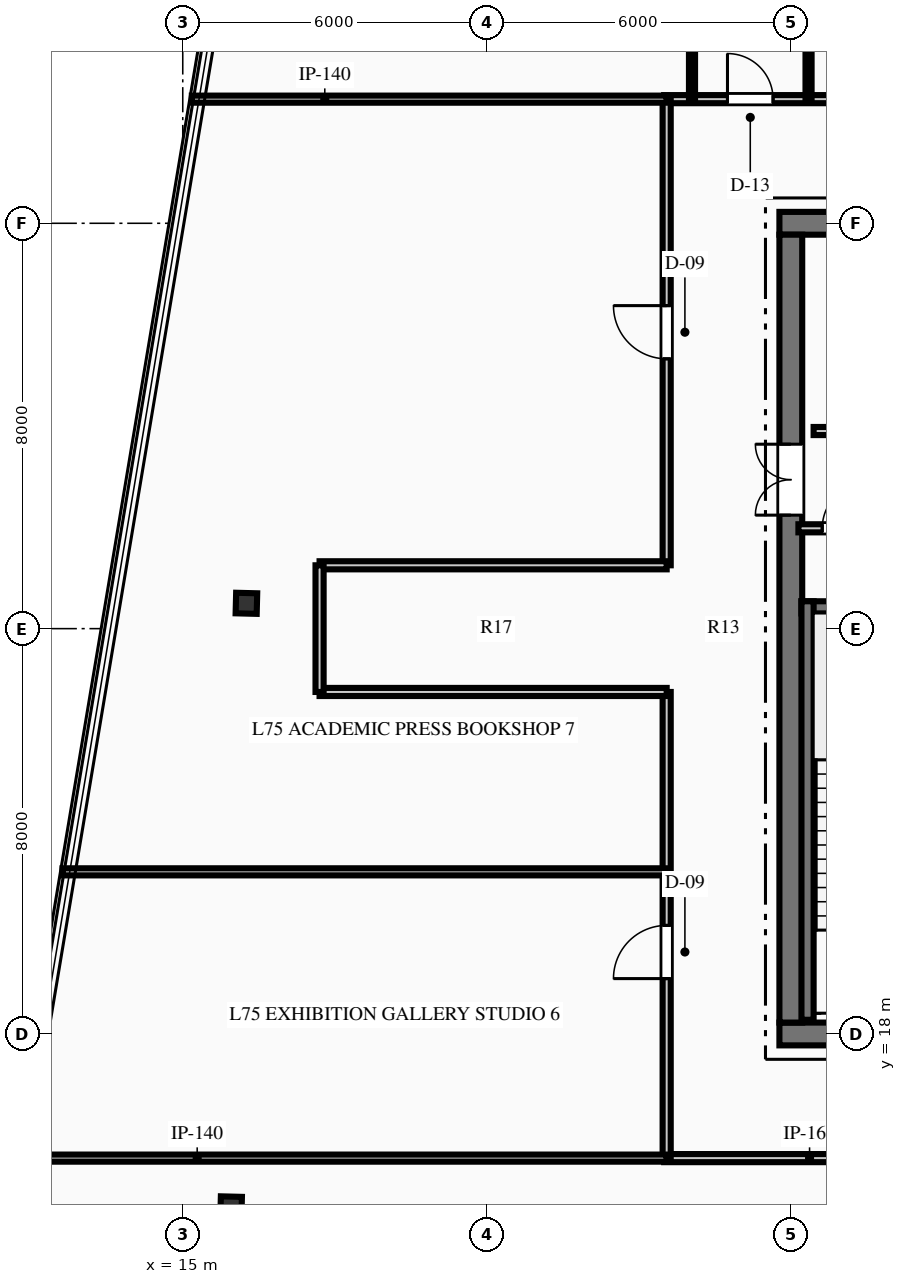
"""IFC4 building model, lengths in metres.
Left out: names, types, materials, properties, quantities, classifications, styles, units other than length and angle.
Written with IfcOpenShell. Run it as: python <this file> out.ifc"""

import sys

from ifc_helpers import new_model, si_unit, direction, frame, frame_2d, origin, origin_2d, place, context, subcontext, project, spatial, rectangle, i_section, extrude, element, fill, save


model = new_model("IFC4")
c1 = context("Model", 3, precision=1e-05, world=origin(), true_north=direction((0.0, 1.0)))
c2 = subcontext(c1, "Body", "Model", "MODEL_VIEW")
j1 = project(units=[si_unit("LENGTHUNIT", "METRE"), si_unit("PLANEANGLEUNIT", "RADIAN")], contexts=[c1])
p1 = place(None, origin())
s1 = spatial("IfcSite", under=j1, at=p1, CompositionType="ELEMENT")
p2 = place(p1, origin())
s2 = spatial("IfcBuilding", under=s1, at=p2, CompositionType="ELEMENT")
p3 = place(p2, frame((0.0, 0.0, 298.2)))
s3 = spatial("IfcBuildingStorey", under=s2, at=p3, CompositionType="ELEMENT", Elevation=298.2)
p4 = place(p3, frame((26.775, 18.0, 0.0), z_axis=(0.0, 0.0, 1.0), x_axis=(1.0, 0.0, 0.0)))
e1 = element("IfcWall", 1, at=p4, inside=s3, PredefinedType="SHEAR", context=c2, shape_type="SweptSolid", body=[
    extrude(rectangle(XDim=18.45, YDim=0.45, at=frame_2d((9.225, 0.0))), origin(), (0.0, 0.0, 1.0), 4.5),
])
p5 = place(p4, frame((7.325, 0.0, 0.0)))
e2 = element("IfcOpeningElement", 2, at=p5, cuts=e1, PredefinedType="OPENING", context=c2, shape_type="SweptSolid", body=[
    extrude(rectangle(XDim=1.1, YDim=2.15, at=frame_2d((0.55, 1.075))), frame((0.0, 0.235, 0.0), z_axis=(0.0, -1.0, 0.0), x_axis=(1.0, 0.0, 0.0)), (0.0, 0.0, 1.0), 0.47),
])
p6 = place(p4, frame((10.025, 0.0, 0.0)))
e3 = element("IfcOpeningElement", 3, at=p6, cuts=e1, PredefinedType="OPENING", context=c2, shape_type="SweptSolid", body=[
    extrude(rectangle(XDim=1.1, YDim=2.15, at=frame_2d((0.55, 1.075))), frame((0.0, 0.235, 0.0), z_axis=(0.0, -1.0, 0.0), x_axis=(1.0, 0.0, 0.0)), (0.0, 0.0, 1.0), 0.47),
])
p7 = place(p3, frame((26.775, 34.0, 0.0), z_axis=(0.0, 0.0, 1.0), x_axis=(1.0, 0.0, 0.0)))
e4 = element("IfcWall", 4, at=p7, inside=s3, PredefinedType="SHEAR", context=c2, shape_type="SweptSolid", body=[
    extrude(rectangle(XDim=18.45, YDim=0.45, at=frame_2d((9.225, 0.0))), origin(), (0.0, 0.0, 1.0), 4.5),
])
p8 = place(p3, frame((27.0, 18.225, 0.0), z_axis=(0.0, 0.0, 1.0), x_axis=(0.0, 1.0, 0.0)))
e5 = element("IfcWall", 5, at=p8, inside=s3, PredefinedType="SHEAR", context=c2, shape_type="SweptSolid", body=[
    extrude(rectangle(XDim=15.55, YDim=0.45, at=frame_2d((7.775, 0.0))), origin(), (0.0, 0.0, 1.0), 4.5),
])
p9 = place(p8, frame((10.015, 0.0, 0.0)))
e6 = element("IfcOpeningElement", 6, at=p9, cuts=e5, PredefinedType="OPENING", context=c2, shape_type="SweptSolid", body=[
    extrude(rectangle(XDim=1.4, YDim=2.2, at=frame_2d((0.7, 1.1))), frame((0.0, 0.235, 0.0), z_axis=(0.0, -1.0, 0.0), x_axis=(1.0, 0.0, 0.0)), (0.0, 0.0, 1.0), 0.47),
])
p10 = place(p3, frame((27.21, 26.42, 0.0), z_axis=(0.0, 0.0, 1.0), x_axis=(1.0, 0.0, 0.0)))
e7 = element("IfcWall", 7, at=p10, inside=s3, PredefinedType="SHEAR", context=c2, shape_type="SweptSolid", body=[
    extrude(rectangle(XDim=3.98, YDim=0.24, at=frame_2d((1.99, 0.0))), origin(), (0.0, 0.0, 1.0), 4.5),
])
p11 = place(p3, frame((27.33, 18.28, 0.0), z_axis=(0.0, 0.0, 1.0), x_axis=(0.0, 1.0, 0.0)))
e8 = element("IfcWall", 8, at=p11, inside=s3, PredefinedType="SHEAR", context=c2, shape_type="SweptSolid", body=[
    extrude(rectangle(XDim=8.26, YDim=0.24, at=frame_2d((4.13, 0.0))), origin(), (0.0, 0.0, 1.0), 4.5),
])
for number, where, z_axis, x_axis in (
    (9, (16.256, 26.5, 0.0), (0.0, 0.0, 1.0), (0.025, 1.0, 0.0)),
    (10, (15.955, 14.588, 0.0), (0.0, 0.0, 1.0), (0.025, 1.0, 0.0)),
):
    element("IfcColumn", number, at=place(p3, frame(where, z_axis=z_axis, x_axis=x_axis)), inside=s3, PredefinedType="COLUMN", context=c2, shape_type="SweptSolid", body=[
        extrude(i_section(OverallWidth=0.406, OverallDepth=0.416, WebThickness=0.03, FlangeThickness=0.048, at=origin_2d()), origin(), (0.0, 0.0, 1.0), 4.5),
    ])
p12 = place(p3, frame((27.15, 27.98, 0.0), z_axis=(0.0, 0.0, 1.0), x_axis=(1.0, 0.0, 0.0)))
e11 = element("IfcWall", 11, at=p12, inside=s3, PredefinedType="PARTITIONING", context=c2, shape_type="SweptSolid", body=[
    extrude(rectangle(XDim=4.05, YDim=0.16, at=frame_2d((2.025, 0.0))), origin(), (0.0, 0.0, 1.0), 4.24),
])
p13 = place(p12, frame((0.47, 0.0, 0.0)))
e12 = element("IfcOpeningElement", 12, at=p13, cuts=e11, PredefinedType="OPENING", context=c2, shape_type="SweptSolid", body=[
    extrude(rectangle(XDim=0.9, YDim=2.15, at=frame_2d((0.45, 1.075))), frame((0.0, 0.09, 0.0), z_axis=(0.0, -1.0, 0.0), x_axis=(1.0, 0.0, 0.0)), (0.0, 0.0, 1.0), 0.18),
])
p14 = place(p12, frame((2.36, 0.0, 0.0)))
e13 = element("IfcOpeningElement", 13, at=p14, cuts=e11, PredefinedType="OPENING", context=c2, shape_type="SweptSolid", body=[
    extrude(rectangle(XDim=0.9, YDim=2.15, at=frame_2d((0.45, 1.075))), frame((0.0, 0.09, 0.0), z_axis=(0.0, -1.0, 0.0), x_axis=(1.0, 0.0, 0.0)), (0.0, 0.0, 1.0), 0.18),
])
p15 = place(p3, frame((27.45, 29.9, 0.0), z_axis=(0.0, 0.0, 1.0), x_axis=(1.0, 0.0, 0.0)))
e14 = element("IfcWall", 14, at=p15, inside=s3, PredefinedType="PARTITIONING", context=c2, shape_type="SweptSolid", body=[
    extrude(rectangle(XDim=4.43, YDim=0.16, at=frame_2d((2.215, 0.0))), origin(), (0.0, 0.0, 1.0), 4.24),
])
p16 = place(p15, frame((0.6, 0.0, 0.0)))
e15 = element("IfcOpeningElement", 15, at=p16, cuts=e14, PredefinedType="OPENING", context=c2, shape_type="SweptSolid", body=[
    extrude(rectangle(XDim=0.9, YDim=2.15, at=frame_2d((0.45, 1.075))), frame((0.0, 0.09, 0.0), z_axis=(0.0, -1.0, 0.0), x_axis=(1.0, 0.0, 0.0)), (0.0, 0.0, 1.0), 0.18),
])
p17 = place(p15, frame((2.85, 0.0, 0.0)))
e16 = element("IfcOpeningElement", 16, at=p17, cuts=e14, PredefinedType="OPENING", context=c2, shape_type="SweptSolid", body=[
    extrude(rectangle(XDim=0.9, YDim=2.15, at=frame_2d((0.45, 1.075))), frame((0.0, 0.09, 0.0), z_axis=(0.0, -1.0, 0.0), x_axis=(1.0, 0.0, 0.0)), (0.0, 0.0, 1.0), 0.18),
])
p18 = place(p3, frame((24.5, 15.55, 0.0), z_axis=(0.0, 0.0, 1.0), x_axis=(1.0, 0.0, 0.0)))
e17 = element("IfcWall", 17, at=p18, inside=s3, PredefinedType="PARTITIONING", context=c2, shape_type="SweptSolid", body=[
    extrude(rectangle(XDim=10.25, YDim=0.16, at=frame_2d((5.125, 0.0))), origin(), (0.0, 0.0, 1.0), 4.24),
])
p19 = place(p18, frame((4.6, 0.0, 0.0)))
e18 = element("IfcOpeningElement", 18, at=p19, cuts=e17, PredefinedType="OPENING", context=c2, shape_type="SweptSolid", body=[
    extrude(rectangle(XDim=1.05, YDim=2.15, at=frame_2d((0.525, 1.075))), frame((0.0, 0.09, 0.0), z_axis=(0.0, -1.0, 0.0), x_axis=(1.0, 0.0, 0.0)), (0.0, 0.0, 1.0), 0.18),
])
p20 = place(p3, frame((24.5, 36.45, 0.0), z_axis=(0.0, 0.0, 1.0), x_axis=(1.0, 0.0, 0.0)))
e19 = element("IfcWall", 19, at=p20, inside=s3, PredefinedType="PARTITIONING", context=c2, shape_type="SweptSolid", body=[
    extrude(rectangle(XDim=10.25, YDim=0.16, at=frame_2d((5.125, 0.0))), origin(), (0.0, 0.0, 1.0), 4.24),
])
p21 = place(p20, frame((1.25, 0.0, 0.0)))
e20 = element("IfcOpeningElement", 20, at=p21, cuts=e19, PredefinedType="OPENING", context=c2, shape_type="SweptSolid", body=[
    extrude(rectangle(XDim=0.9, YDim=2.15, at=frame_2d((0.45, 1.075))), frame((0.0, 0.09, 0.0), z_axis=(0.0, -1.0, 0.0), x_axis=(1.0, 0.0, 0.0)), (0.0, 0.0, 1.0), 0.18),
])
p22 = place(p20, frame((3.55, 0.0, 0.0)))
e21 = element("IfcOpeningElement", 21, at=p22, cuts=e19, PredefinedType="OPENING", context=c2, shape_type="SweptSolid", body=[
    extrude(rectangle(XDim=0.9, YDim=2.15, at=frame_2d((0.45, 1.075))), frame((0.0, 0.09, 0.0), z_axis=(0.0, -1.0, 0.0), x_axis=(1.0, 0.0, 0.0)), (0.0, 0.0, 1.0), 0.18),
])
p23 = place(p20, frame((5.8, 0.0, 0.0)))
e22 = element("IfcOpeningElement", 22, at=p23, cuts=e19, PredefinedType="OPENING", context=c2, shape_type="SweptSolid", body=[
    extrude(rectangle(XDim=1.0, YDim=2.15, at=frame_2d((0.5, 1.075))), frame((0.0, 0.09, 0.0), z_axis=(0.0, -1.0, 0.0), x_axis=(1.0, 0.0, 0.0)), (0.0, 0.0, 1.0), 0.18),
])
p24 = place(p3, frame((24.55, 15.55, 0.0), z_axis=(0.0, 0.0, 1.0), x_axis=(0.0, 1.0, 0.0)))
e23 = element("IfcWall", 23, at=p24, inside=s3, PredefinedType="PARTITIONING", context=c2, shape_type="SweptSolid", body=[
    extrude(rectangle(XDim=9.2, YDim=0.16, at=frame_2d((4.6, 0.0))), origin(), (0.0, 0.0, 1.0), 4.24),
])
p25 = place(p24, frame((3.543, 0.0, 0.0)))
e24 = element("IfcOpeningElement", 24, at=p25, cuts=e23, PredefinedType="OPENING", context=c2, shape_type="SweptSolid", body=[
    extrude(rectangle(XDim=1.05, YDim=2.15, at=frame_2d((0.525, 1.075))), frame((0.0, 0.09, 0.0), z_axis=(0.0, -1.0, 0.0), x_axis=(1.0, 0.0, 0.0)), (0.0, 0.0, 1.0), 0.18),
])
p26 = place(p3, frame((24.55, 27.25, 0.0), z_axis=(0.0, 0.0, 1.0), x_axis=(0.0, 1.0, 0.0)))
e25 = element("IfcWall", 25, at=p26, inside=s3, PredefinedType="PARTITIONING", context=c2, shape_type="SweptSolid", body=[
    extrude(rectangle(XDim=9.2, YDim=0.16, at=frame_2d((4.6, 0.0))), origin(), (0.0, 0.0, 1.0), 4.24),
])
p27 = place(p26, frame((4.075, 0.0, 0.0)))
e26 = element("IfcOpeningElement", 26, at=p27, cuts=e25, PredefinedType="OPENING", context=c2, shape_type="SweptSolid", body=[
    extrude(rectangle(XDim=1.05, YDim=2.15, at=frame_2d((0.525, 1.075))), frame((0.0, 0.09, 0.0), z_axis=(0.0, -1.0, 0.0), x_axis=(1.0, 0.0, 0.0)), (0.0, 0.0, 1.0), 0.18),
])
for number, where, z_axis, x_axis in (
    (27, (17.7, 24.75, 0.0), (0.0, 0.0, 1.0), (1.0, 0.0, 0.0)),
    (28, (17.7, 27.25, 0.0), (0.0, 0.0, 1.0), (1.0, 0.0, 0.0)),
):
    element("IfcWall", number, at=place(p3, frame(where, z_axis=z_axis, x_axis=x_axis)), inside=s3, PredefinedType="PARTITIONING", context=c2, shape_type="SweptSolid", body=[
        extrude(rectangle(XDim=6.85, YDim=0.16, at=frame_2d((3.425, 0.0))), origin(), (0.0, 0.0, 1.0), 4.24),
    ])
p28 = place(p3, frame((17.7, 24.75, 0.0), z_axis=(0.0, 0.0, 1.0), x_axis=(0.0, 1.0, 0.0)))
e29 = element("IfcWall", 29, at=p28, inside=s3, PredefinedType="PARTITIONING", context=c2, shape_type="SweptSolid", body=[
    extrude(rectangle(XDim=2.5, YDim=0.16, at=frame_2d((1.25, 0.0))), origin(), (0.0, 0.0, 1.0), 4.24),
])
for number, where, z_axis, x_axis in (
    (30, (25.05, 36.45, 0.0), (0.0, 0.0, 1.0), (0.0, 1.0, 0.0)),
    (31, (27.35, 36.45, 0.0), (0.0, 0.0, 1.0), (0.0, 1.0, 0.0)),
):
    element("IfcWall", number, at=place(p3, frame(where, z_axis=z_axis, x_axis=x_axis)), inside=s3, PredefinedType="PARTITIONING", context=c2, shape_type="SweptSolid", body=[
        extrude(rectangle(XDim=3.9, YDim=0.12, at=frame_2d((1.95, 0.0))), origin(), (0.0, 0.0, 1.0), 4.24),
    ])
p29 = place(p3, frame((11.682, 15.55, 0.0), z_axis=(0.0, 0.0, 1.0), x_axis=(1.0, 0.0, 0.0)))
e32 = element("IfcWall", 32, at=p29, inside=s3, PredefinedType="PARTITIONING", context=c2, shape_type="SweptSolid", body=[
    extrude(rectangle(XDim=12.868, YDim=0.14, at=frame_2d((6.434, 0.0))), origin(), (0.0, 0.0, 1.0), 3.829),
])
p30 = place(p3, frame((15.179, 36.45, 0.0), z_axis=(0.0, 0.0, 1.0), x_axis=(1.0, 0.0, 0.0)))
e33 = element("IfcWall", 33, at=p30, inside=s3, PredefinedType="PARTITIONING", context=c2, shape_type="SweptSolid", body=[
    extrude(rectangle(XDim=9.371, YDim=0.14, at=frame_2d((4.686, 0.0))), origin(), (0.0, 0.0, 1.0), 3.618),
])
p31 = place(p3, frame((12.627, 21.2, 0.0), z_axis=(0.0, 0.0, 1.0), x_axis=(1.0, 0.0, 0.0)))
e34 = element("IfcWall", 34, at=p31, inside=s3, PredefinedType="PARTITIONING", context=c2, shape_type="SweptSolid", body=[
    extrude(rectangle(XDim=11.923, YDim=0.14, at=frame_2d((5.961, 0.0))), origin(), (0.0, 0.0, 1.0), 4.24),
])
p32 = place(p13, origin())
e35 = element("IfcDoor", 35, at=p32, inside=s3, OperationType="SINGLE_SWING_RIGHT", PredefinedType="DOOR", context=c2, shape_type="SweptSolid", body=[
    extrude(rectangle(XDim=0.9, YDim=2.15, at=frame_2d((0.45, 1.075))), frame((0.0, 0.025, 0.0), z_axis=(0.0, -1.0, 0.0), x_axis=(1.0, 0.0, 0.0)), (0.0, 0.0, 1.0), 0.05),
])
fill(e12, e35)
p33 = place(p9, origin())
e36 = element("IfcDoor", 36, at=p33, inside=s3, OperationType="DOUBLE_DOOR_SINGLE_SWING", PredefinedType="DOOR", context=c2, shape_type="SweptSolid", body=[
    extrude(rectangle(XDim=1.4, YDim=2.2, at=frame_2d((0.7, 1.1))), frame((0.0, 0.025, 0.0), z_axis=(0.0, -1.0, 0.0), x_axis=(1.0, 0.0, 0.0)), (0.0, 0.0, 1.0), 0.05),
])
fill(e6, e36)
p34 = place(p21, origin())
e37 = element("IfcDoor", 37, at=p34, inside=s3, OperationType="SINGLE_SWING_LEFT", PredefinedType="DOOR", context=c2, shape_type="SweptSolid", body=[
    extrude(rectangle(XDim=0.9, YDim=2.15, at=frame_2d((0.45, 1.075))), frame((0.0, 0.025, 0.0), z_axis=(0.0, -1.0, 0.0), x_axis=(1.0, 0.0, 0.0)), (0.0, 0.0, 1.0), 0.05),
])
fill(e20, e37)
p35 = place(p25, origin())
e38 = element("IfcDoor", 38, at=p35, inside=s3, OperationType="SINGLE_SWING_LEFT", PredefinedType="DOOR", context=c2, shape_type="SweptSolid", body=[
    extrude(rectangle(XDim=1.05, YDim=2.15, at=frame_2d((0.525, 1.075))), frame((0.0, 0.025, 0.0), z_axis=(0.0, -1.0, 0.0), x_axis=(1.0, 0.0, 0.0)), (0.0, 0.0, 1.0), 0.05),
])
fill(e24, e38)
p36 = place(p27, origin())
e39 = element("IfcDoor", 39, at=p36, inside=s3, OperationType="SINGLE_SWING_RIGHT", PredefinedType="DOOR", context=c2, shape_type="SweptSolid", body=[
    extrude(rectangle(XDim=1.05, YDim=2.15, at=frame_2d((0.525, 1.075))), frame((0.0, 0.025, 0.0), z_axis=(0.0, -1.0, 0.0), x_axis=(1.0, 0.0, 0.0)), (0.0, 0.0, 1.0), 0.05),
])
fill(e26, e39)
save(model, sys.argv[1])
